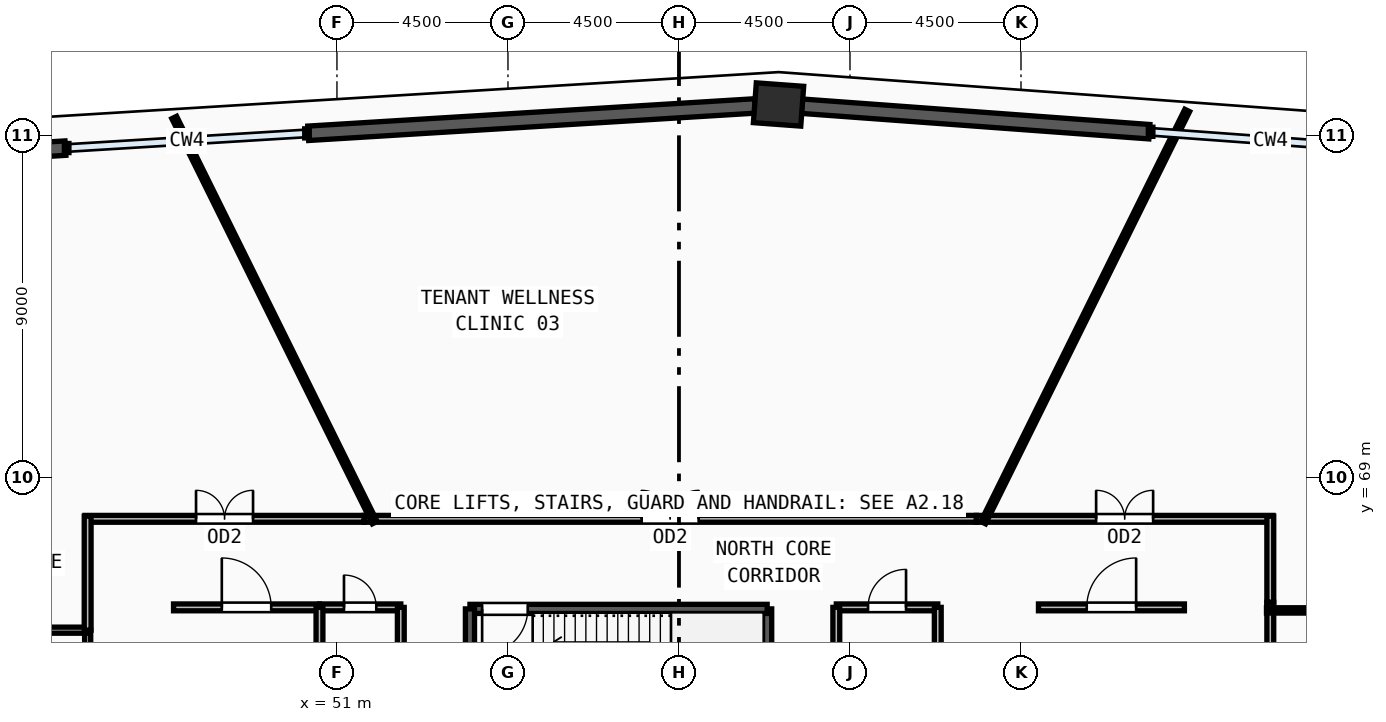
"""IFC4 building model, lengths in metres.
Left out: names, types, materials, properties, quantities, classifications, styles, units other than length and angle.
Written with IfcOpenShell. Run it as: python <this file> out.ifc"""

import sys

from ifc_helpers import new_model, si_unit, direction, frame, frame_2d, origin, origin_2d, place, context, subcontext, project, spatial, rectangle, extrude, source, transform, mapped, element, fill, save


model = new_model("IFC4")
c1 = context("Model", 3, precision=1e-05, world=origin(), true_north=direction((0.0, 1.0)))
c2 = subcontext(c1, "Body", "Model", "MODEL_VIEW")
j1 = project(units=[si_unit("LENGTHUNIT", "METRE"), si_unit("PLANEANGLEUNIT", "RADIAN")], contexts=[c1])
p1 = place(None, origin())
s1 = spatial("IfcSite", under=j1, at=p1, CompositionType="ELEMENT")
p2 = place(p1, origin())
s2 = spatial("IfcBuilding", under=s1, at=p2, CompositionType="ELEMENT")
p3 = place(p2, frame((0.0, 0.0, 189.75)))
s3 = spatial("IfcBuildingStorey", under=s2, at=p3, CompositionType="ELEMENT", Elevation=189.75)
m1 = source(origin(), c2, "Body", "SweptSolid", [
    extrude(rectangle(XDim=1.25, YDim=1.05, at=origin_2d()), origin(), (0.0, 0.0, 1.0), 4.5),
])
p4 = place(p3, frame((62.62, 78.812, 0.0), z_axis=(0.0, 0.0, 1.0), x_axis=(-0.997327244511, 0.0730641318, 0.0)))
e1 = element("IfcColumn", 1, at=p4, inside=s3, PredefinedType="COLUMN", context=c2, shape_type="MappedRepresentation", body=[
    mapped(m1, transform((0.0, 0.0, 0.0), x_axis=(1.0, 0.0, 0.0), y_axis=(0.0, 1.0, 0.0), z_axis=(0.0, 0.0, 1.0), scale=1.0)),
])
p5 = place(p3, frame((72.378, 78.096, 0.0), z_axis=(0.0, 0.0, 1.0), x_axis=(-0.997317866929, 0.073192023498, 0.0)))
e2 = element("IfcWall", 2, at=p5, inside=s3, PredefinedType="SOLIDWALL", context=c2, shape_type="SweptSolid", body=[
    extrude(rectangle(XDim=9.17, YDim=0.38, at=frame_2d((4.585, 0.0))), origin(), (0.0, 0.0, 1.0), 4.32),
])
p6 = place(p3, frame((62.006, 78.774, 0.0), z_axis=(0.0, 0.0, 1.0), x_axis=(-0.998131884523, -0.061096162719, 0.0)))
e3 = element("IfcWall", 3, at=p6, inside=s3, PredefinedType="SOLIDWALL", context=c2, shape_type="SweptSolid", body=[
    extrude(rectangle(XDim=11.784, YDim=0.38, at=frame_2d((5.892, 0.0))), origin(), (0.0, 0.0, 1.0), 4.32),
])
p7 = place(p3, frame((43.855, 77.664, 0.0), z_axis=(0.0, 0.0, 1.0), x_axis=(-0.998131807187, -0.061097426145, 0.0)))
e4 = element("IfcWall", 4, at=p7, inside=s3, PredefinedType="SOLIDWALL", context=c2, shape_type="SweptSolid", body=[
    extrude(rectangle(XDim=11.784, YDim=0.38, at=frame_2d((5.892, 0.0))), origin(), (0.0, 0.0, 1.0), 4.32),
])
p8 = place(p3, frame((62.32, 62.1, 0.0), z_axis=(0.0, 0.0, 1.0), x_axis=(0.0, 1.0, 0.0)))
e5 = element("IfcWall", 5, at=p8, inside=s3, PredefinedType="SOLIDWALL", context=c2, shape_type="SweptSolid", body=[
    extrude(rectangle(XDim=3.44, YDim=0.24, at=frame_2d((1.72, 0.0))), origin(), (0.0, 0.0, 1.0), 4.32),
])
p9 = place(p3, frame((62.32, 65.54, 0.0), z_axis=(0.0, 0.0, 1.0), x_axis=(-1.0, 0.0, 0.0)))
e6 = element("IfcWall", 6, at=p9, inside=s3, PredefinedType="SOLIDWALL", context=c2, shape_type="SweptSolid", body=[
    extrude(rectangle(XDim=7.82, YDim=0.24, at=frame_2d((3.91, 0.0))), origin(), (0.0, 0.0, 1.0), 4.32),
])
m2 = source(origin(), c2, "Body", "SweptSolid", [
    extrude(rectangle(XDim=1.2, YDim=2.2, at=frame_2d((0.6, 1.1))), frame((0.0, 0.13, 0.0), z_axis=(0.0, -1.0, 0.0), x_axis=(1.0, 0.0, 0.0)), (0.0, 0.0, 1.0), 0.26),
])
p10 = place(p9, frame((6.3, 0.0, 0.0)))
e7 = element("IfcOpeningElement", 7, at=p10, cuts=e6, PredefinedType="OPENING", context=c2, shape_type="MappedRepresentation", body=[
    mapped(m2, transform((0.0, 0.0, 0.0), x_axis=(1.0, 0.0, 0.0), y_axis=(0.0, 1.0, 0.0), z_axis=(0.0, 0.0, 1.0), scale=1.0)),
])
p11 = place(p3, frame((54.5, 65.54, 0.0), z_axis=(0.0, 0.0, 1.0), x_axis=(0.0, -1.0, 0.0)))
e8 = element("IfcWall", 8, at=p11, inside=s3, PredefinedType="SOLIDWALL", context=c2, shape_type="SweptSolid", body=[
    extrude(rectangle(XDim=3.44, YDim=0.24, at=frame_2d((1.72, 0.0))), origin(), (0.0, 0.0, 1.0), 4.32),
])
p12 = place(p3, frame((44.44, 62.24, 0.0), z_axis=(0.0, 0.0, 1.0), x_axis=(0.0, 1.0, 0.0)))
e9 = element("IfcWall", 9, at=p12, inside=s3, PredefinedType="PARTITIONING", context=c2, shape_type="SweptSolid", body=[
    extrude(rectangle(XDim=2.74, YDim=0.16, at=frame_2d((1.37, 0.0))), origin(), (0.0, 0.0, 1.0), 4.32),
])
m3 = source(origin(), c2, "Body", "SweptSolid", [
    extrude(rectangle(XDim=1.05, YDim=2.15, at=frame_2d((0.525, 1.075))), frame((0.0, 0.09, 0.0), z_axis=(0.0, -1.0, 0.0), x_axis=(1.0, 0.0, 0.0)), (0.0, 0.0, 1.0), 0.18),
])
p13 = place(p12, frame((0.845, 0.0, 0.0)))
e10 = element("IfcOpeningElement", 10, at=p13, cuts=e9, PredefinedType="OPENING", context=c2, shape_type="MappedRepresentation", body=[
    mapped(m3, transform((0.0, 0.0, 0.0), x_axis=(1.0, 0.0, 0.0), y_axis=(0.0, 1.0, 0.0), z_axis=(0.0, 0.0, 1.0), scale=1.0)),
])
p14 = place(p3, frame((50.54, 65.58, 0.0), z_axis=(0.0, 0.0, 1.0), x_axis=(1.0, 0.0, 0.0)))
e11 = element("IfcWall", 11, at=p14, inside=s3, PredefinedType="PARTITIONING", context=c2, shape_type="SweptSolid", body=[
    extrude(rectangle(XDim=2.14, YDim=0.18, at=frame_2d((1.07, 0.0))), origin(), (0.0, 0.0, 1.0), 4.32),
])
m4 = source(origin(), c2, "Body", "SweptSolid", [
    extrude(rectangle(XDim=0.85, YDim=2.1, at=frame_2d((0.425, 1.05))), frame((0.0, 0.1, 0.0), z_axis=(0.0, -1.0, 0.0), x_axis=(1.0, 0.0, 0.0)), (0.0, 0.0, 1.0), 0.2),
])
p15 = place(p14, frame((0.645, 0.0, 0.0)))
e12 = element("IfcOpeningElement", 12, at=p15, cuts=e11, PredefinedType="OPENING", context=c2, shape_type="MappedRepresentation", body=[
    mapped(m4, transform((0.0, 0.0, 0.0), x_axis=(1.0, 0.0, 0.0), y_axis=(0.0, 1.0, 0.0), z_axis=(0.0, 0.0, 1.0), scale=1.0)),
])
p16 = place(p3, frame((64.14, 65.58, 0.0), z_axis=(0.0, 0.0, 1.0), x_axis=(1.0, 0.0, 0.0)))
e13 = element("IfcWall", 13, at=p16, inside=s3, PredefinedType="PARTITIONING", context=c2, shape_type="SweptSolid", body=[
    extrude(rectangle(XDim=2.67, YDim=0.18, at=frame_2d((1.335, 0.0))), origin(), (0.0, 0.0, 1.0), 4.32),
])
m5 = source(origin(), c2, "Body", "SweptSolid", [
    extrude(rectangle(XDim=1.0, YDim=2.2, at=frame_2d((0.5, 1.1))), frame((0.0, 0.1, 0.0), z_axis=(0.0, -1.0, 0.0), x_axis=(1.0, 0.0, 0.0)), (0.0, 0.0, 1.0), 0.2),
])
p17 = place(p16, frame((0.835, 0.0, 0.0)))
e14 = element("IfcOpeningElement", 14, at=p17, cuts=e13, PredefinedType="OPENING", context=c2, shape_type="MappedRepresentation", body=[
    mapped(m5, transform((0.0, 0.0, 0.0), x_axis=(1.0, 0.0, 0.0), y_axis=(0.0, 1.0, 0.0), z_axis=(0.0, 0.0, 1.0), scale=1.0)),
])
p18 = place(p3, frame((46.7, 65.58, 0.0), z_axis=(0.0, 0.0, 1.0), x_axis=(1.0, 0.0, 0.0)))
e15 = element("IfcWall", 15, at=p18, inside=s3, PredefinedType="PARTITIONING", context=c2, shape_type="SweptSolid", body=[
    extrude(rectangle(XDim=3.84, YDim=0.18, at=frame_2d((1.92, 0.0))), origin(), (0.0, 0.0, 1.0), 4.32),
])
m6 = source(origin(), c2, "Body", "SweptSolid", [
    extrude(rectangle(XDim=1.3, YDim=2.2, at=frame_2d((0.65, 1.1))), frame((0.0, 0.1, 0.0), z_axis=(0.0, -1.0, 0.0), x_axis=(1.0, 0.0, 0.0)), (0.0, 0.0, 1.0), 0.2),
])
p19 = place(p18, frame((1.27, 0.0, 0.0)))
e16 = element("IfcOpeningElement", 16, at=p19, cuts=e15, PredefinedType="OPENING", context=c2, shape_type="MappedRepresentation", body=[
    mapped(m6, transform((0.0, 0.0, 0.0), x_axis=(1.0, 0.0, 0.0), y_axis=(0.0, 1.0, 0.0), z_axis=(0.0, 0.0, 1.0), scale=1.0)),
])
p20 = place(p3, frame((69.46, 65.58, 0.0), z_axis=(0.0, 0.0, 1.0), x_axis=(1.0, 0.0, 0.0)))
e17 = element("IfcWall", 17, at=p20, inside=s3, PredefinedType="PARTITIONING", context=c2, shape_type="SweptSolid", body=[
    extrude(rectangle(XDim=3.84, YDim=0.18, at=frame_2d((1.92, 0.0))), origin(), (0.0, 0.0, 1.0), 4.32),
])
p21 = place(p20, frame((1.27, 0.0, 0.0)))
e18 = element("IfcOpeningElement", 18, at=p21, cuts=e17, PredefinedType="OPENING", context=c2, shape_type="MappedRepresentation", body=[
    mapped(m6, transform((0.0, 0.0, 0.0), x_axis=(1.0, 0.0, 0.0), y_axis=(0.0, 1.0, 0.0), z_axis=(0.0, 0.0, 1.0), scale=1.0)),
])
p22 = place(p3, frame((75.56, 65.715, 0.0), z_axis=(0.0, 0.0, 1.0), x_axis=(0.0, -1.0, 0.0)))
e19 = element("IfcWall", 19, at=p22, inside=s3, PredefinedType="PARTITIONING", context=c2, shape_type="SweptSolid", body=[
    extrude(rectangle(XDim=20.93, YDim=0.18, at=frame_2d((10.465, 0.0))), origin(), (0.0, 0.0, 1.0), 4.32),
])
m7 = source(origin(), c2, "Body", "SweptSolid", [
    extrude(rectangle(XDim=1.5, YDim=2.2, at=frame_2d((0.75, 1.1))), frame((0.0, 0.1, 0.0), z_axis=(0.0, -1.0, 0.0), x_axis=(1.0, 0.0, 0.0)), (0.0, 0.0, 1.0), 0.2),
])
p23 = place(p22, frame((9.715, 0.0, 0.0)))
e20 = element("IfcOpeningElement", 20, at=p23, cuts=e19, PredefinedType="OPENING", context=c2, shape_type="MappedRepresentation", body=[
    mapped(m7, transform((0.0, 0.0, 0.0), x_axis=(1.0, 0.0, 0.0), y_axis=(0.0, 1.0, 0.0), z_axis=(0.0, 0.0, 1.0), scale=1.0)),
])
p24 = place(p3, frame((67.823, 67.91, 0.0), z_axis=(0.0, 0.0, 1.0), x_axis=(1.0, 0.0, 0.0)))
e21 = element("IfcWall", 21, at=p24, inside=s3, PredefinedType="PARTITIONING", context=c2, shape_type="SweptSolid", body=[
    extrude(rectangle(XDim=7.807, YDim=0.18, at=frame_2d((3.903, 0.0))), origin(), (0.0, 0.0, 1.0), 4.32),
])
p25 = place(p24, frame((3.154, 0.0, 0.0)))
e22 = element("IfcOpeningElement", 22, at=p25, cuts=e21, PredefinedType="OPENING", context=c2, shape_type="MappedRepresentation", body=[
    mapped(m7, transform((0.0, 0.0, 0.0), x_axis=(1.0, 0.0, 0.0), y_axis=(0.0, 1.0, 0.0), z_axis=(0.0, 0.0, 1.0), scale=1.0)),
])
p26 = place(p3, frame((51.714, 67.91, 0.0), z_axis=(0.0, 0.0, 1.0), x_axis=(1.0, 0.0, 0.0)))
e23 = element("IfcWall", 23, at=p26, inside=s3, PredefinedType="PARTITIONING", context=c2, shape_type="SweptSolid", body=[
    extrude(rectangle(XDim=16.109, YDim=0.18, at=frame_2d((8.054, 0.0))), origin(), (0.0, 0.0, 1.0), 4.32),
])
p27 = place(p26, frame((7.304, 0.0, 0.0)))
e24 = element("IfcOpeningElement", 24, at=p27, cuts=e23, PredefinedType="OPENING", context=c2, shape_type="MappedRepresentation", body=[
    mapped(m7, transform((0.0, 0.0, 0.0), x_axis=(1.0, 0.0, 0.0), y_axis=(0.0, 1.0, 0.0), z_axis=(0.0, 0.0, 1.0), scale=1.0)),
])
p28 = place(p3, frame((44.37, 67.91, 0.0), z_axis=(0.0, 0.0, 1.0), x_axis=(1.0, 0.0, 0.0)))
e25 = element("IfcWall", 25, at=p28, inside=s3, PredefinedType="PARTITIONING", context=c2, shape_type="SweptSolid", body=[
    extrude(rectangle(XDim=7.344, YDim=0.18, at=frame_2d((3.672, 0.0))), origin(), (0.0, 0.0, 1.0), 4.32),
])
p29 = place(p28, frame((2.922, 0.0, 0.0)))
e26 = element("IfcOpeningElement", 26, at=p29, cuts=e25, PredefinedType="OPENING", context=c2, shape_type="MappedRepresentation", body=[
    mapped(m7, transform((0.0, 0.0, 0.0), x_axis=(1.0, 0.0, 0.0), y_axis=(0.0, 1.0, 0.0), z_axis=(0.0, 0.0, 1.0), scale=1.0)),
])
p30 = place(p3, frame((39.98, 64.98, 0.0), z_axis=(0.0, 0.0, 1.0), x_axis=(1.0, 0.0, 0.0)))
e27 = element("IfcWall", 27, at=p30, inside=s3, PredefinedType="PARTITIONING", context=c2, shape_type="SweptSolid", body=[
    extrude(rectangle(XDim=4.46, YDim=0.16, at=frame_2d((2.23, 0.0))), origin(), (0.0, 0.0, 1.0), 4.32),
])
p31 = place(p3, frame((50.54, 61.95, 0.0), z_axis=(0.0, 0.0, 1.0), x_axis=(0.0, 1.0, 0.0)))
e28 = element("IfcWall", 28, at=p31, inside=s3, PredefinedType="PARTITIONING", context=c2, shape_type="SweptSolid", body=[
    extrude(rectangle(XDim=3.63, YDim=0.18, at=frame_2d((1.815, 0.0))), origin(), (0.0, 0.0, 1.0), 4.32),
])
for number, where, z_axis, x_axis in (
    (29, (52.68, 61.825, 0.0), (0.0, 0.0, 1.0), (0.0, 1.0, 0.0)),
    (30, (64.14, 61.825, 0.0), (0.0, 0.0, 1.0), (0.0, 1.0, 0.0)),
    (31, (66.81, 61.825, 0.0), (0.0, 0.0, 1.0), (0.0, 1.0, 0.0)),
):
    element("IfcWall", number, at=place(p3, frame(where, z_axis=z_axis, x_axis=x_axis)), inside=s3, PredefinedType="PARTITIONING", context=c2, shape_type="SweptSolid", body=[
        extrude(rectangle(XDim=3.755, YDim=0.18, at=frame_2d((1.877, 0.0))), origin(), (0.0, 0.0, 1.0), 4.32),
    ])
p32 = place(p3, frame((75.56, 67.98, 0.0), z_axis=(0.0, 0.0, 1.0), x_axis=(0.0, -1.0, 0.0)))
e32 = element("IfcWall", 32, at=p32, inside=s3, PredefinedType="PARTITIONING", context=c2, shape_type="SweptSolid", body=[
    extrude(rectangle(XDim=2.265, YDim=0.18, at=frame_2d((1.132, 0.0))), origin(), (0.0, 0.0, 1.0), 4.32),
])
p33 = place(p3, frame((44.44, 64.98, 0.0), z_axis=(0.0, 0.0, 1.0), x_axis=(0.0, 1.0, 0.0)))
e33 = element("IfcWall", 33, at=p33, inside=s3, PredefinedType="PARTITIONING", context=c2, shape_type="SweptSolid", body=[
    extrude(rectangle(XDim=3.0, YDim=0.18, at=frame_2d((1.5, 0.0))), origin(), (0.0, 0.0, 1.0), 4.32),
])
p34 = place(p3, frame((75.46, 65.5, 0.0), z_axis=(0.0, 0.0, 1.0), x_axis=(1.0, 0.0, 0.0)))
e34 = element("IfcWall", 34, at=p34, inside=s3, PredefinedType="PARTITIONING", context=c2, shape_type="SweptSolid", body=[
    extrude(rectangle(XDim=18.471, YDim=0.14, at=frame_2d((9.235, 0.0))), origin(), (0.0, 0.0, 1.0), 3.605),
])
p35 = place(p3, frame((51.995, 67.81, 0.0), z_axis=(0.0, 0.0, 1.0), x_axis=(-0.443655075379, 0.896197619998, 0.0)))
e35 = element("IfcWall", 35, at=p35, inside=s3, PredefinedType="PARTITIONING", context=c2, shape_type="SweptSolid", body=[
    extrude(rectangle(XDim=11.895, YDim=0.14, at=frame_2d((5.947, 0.0))), origin(), (0.0, 0.0, 1.0), 4.32),
])
p36 = place(p3, frame((68.005, 67.81, 0.0), z_axis=(0.0, 0.0, 1.0), x_axis=(0.443683569349, 0.896183513735, 0.0)))
e36 = element("IfcWall", 36, at=p36, inside=s3, PredefinedType="PARTITIONING", context=c2, shape_type="SweptSolid", body=[
    extrude(rectangle(XDim=12.101, YDim=0.14, at=frame_2d((6.051, 0.0))), origin(), (0.0, 0.0, 1.0), 4.32),
])
m8 = source(origin(), c2, "Body", "SweptSolid", [
    extrude(rectangle(XDim=1.2, YDim=2.2, at=frame_2d((0.6, 1.1))), frame((0.0, 0.025, 0.0), z_axis=(0.0, -1.0, 0.0), x_axis=(1.0, 0.0, 0.0)), (0.0, 0.0, 1.0), 0.05),
])
p37 = place(p10, origin())
e37 = element("IfcDoor", 37, at=p37, inside=s3, OperationType="SINGLE_SWING_RIGHT", PredefinedType="DOOR", context=c2, shape_type="MappedRepresentation", body=[
    mapped(m8, transform((0.0, 0.0, 0.0), x_axis=(1.0, 0.0, 0.0), y_axis=(0.0, 1.0, 0.0), z_axis=(0.0, 0.0, 1.0), scale=1.0)),
])
fill(e7, e37)
m9 = source(origin(), c2, "Body", "SweptSolid", [
    extrude(rectangle(XDim=0.85, YDim=2.1, at=frame_2d((0.425, 1.05))), frame((0.0, 0.025, 0.0), z_axis=(0.0, -1.0, 0.0), x_axis=(1.0, 0.0, 0.0)), (0.0, 0.0, 1.0), 0.05),
])
p38 = place(p15, origin())
e38 = element("IfcDoor", 38, at=p38, inside=s3, OperationType="SINGLE_SWING_LEFT", PredefinedType="DOOR", context=c2, shape_type="MappedRepresentation", body=[
    mapped(m9, transform((0.0, 0.0, 0.0), x_axis=(1.0, 0.0, 0.0), y_axis=(0.0, 1.0, 0.0), z_axis=(0.0, 0.0, 1.0), scale=1.0)),
])
fill(e12, e38)
m10 = source(origin(), c2, "Body", "SweptSolid", [
    extrude(rectangle(XDim=1.0, YDim=2.2, at=frame_2d((0.5, 1.1))), frame((0.0, 0.025, 0.0), z_axis=(0.0, -1.0, 0.0), x_axis=(1.0, 0.0, 0.0)), (0.0, 0.0, 1.0), 0.05),
])
p39 = place(p17, origin())
e39 = element("IfcDoor", 39, at=p39, inside=s3, OperationType="SINGLE_SWING_RIGHT", PredefinedType="DOOR", context=c2, shape_type="MappedRepresentation", body=[
    mapped(m10, transform((0.0, 0.0, 0.0), x_axis=(1.0, 0.0, 0.0), y_axis=(0.0, 1.0, 0.0), z_axis=(0.0, 0.0, 1.0), scale=1.0)),
])
fill(e14, e39)
m11 = source(origin(), c2, "Body", "SweptSolid", [
    extrude(rectangle(XDim=1.3, YDim=2.2, at=frame_2d((0.65, 1.1))), frame((0.0, 0.025, 0.0), z_axis=(0.0, -1.0, 0.0), x_axis=(1.0, 0.0, 0.0)), (0.0, 0.0, 1.0), 0.05),
])
p40 = place(p19, origin())
e40 = element("IfcDoor", 40, at=p40, inside=s3, OperationType="SINGLE_SWING_LEFT", PredefinedType="DOOR", context=c2, shape_type="MappedRepresentation", body=[
    mapped(m11, transform((0.0, 0.0, 0.0), x_axis=(1.0, 0.0, 0.0), y_axis=(0.0, 1.0, 0.0), z_axis=(0.0, 0.0, 1.0), scale=1.0)),
])
fill(e16, e40)
p41 = place(p21, origin())
e41 = element("IfcDoor", 41, at=p41, inside=s3, OperationType="SINGLE_SWING_RIGHT", PredefinedType="DOOR", context=c2, shape_type="MappedRepresentation", body=[
    mapped(m11, transform((0.0, 0.0, 0.0), x_axis=(1.0, 0.0, 0.0), y_axis=(0.0, 1.0, 0.0), z_axis=(0.0, 0.0, 1.0), scale=1.0)),
])
fill(e18, e41)
m12 = source(origin(), c2, "Body", "SweptSolid", [
    extrude(rectangle(XDim=1.5, YDim=2.2, at=frame_2d((0.75, 1.1))), frame((0.0, 0.025, 0.0), z_axis=(0.0, -1.0, 0.0), x_axis=(1.0, 0.0, 0.0)), (0.0, 0.0, 1.0), 0.05),
])
p42 = place(p25, origin())
e42 = element("IfcDoor", 42, at=p42, inside=s3, OperationType="DOUBLE_DOOR_SINGLE_SWING", PredefinedType="DOOR", context=c2, shape_type="MappedRepresentation", body=[
    mapped(m12, transform((0.0, 0.0, 0.0), x_axis=(1.0, 0.0, 0.0), y_axis=(0.0, 1.0, 0.0), z_axis=(0.0, 0.0, 1.0), scale=1.0)),
])
fill(e22, e42)
p43 = place(p27, origin())
e43 = element("IfcDoor", 43, at=p43, inside=s3, OperationType="DOUBLE_DOOR_SINGLE_SWING", PredefinedType="DOOR", context=c2, shape_type="MappedRepresentation", body=[
    mapped(m12, transform((0.0, 0.0, 0.0), x_axis=(1.0, 0.0, 0.0), y_axis=(0.0, 1.0, 0.0), z_axis=(0.0, 0.0, 1.0), scale=1.0)),
])
fill(e24, e43)
p44 = place(p29, origin())
e44 = element("IfcDoor", 44, at=p44, inside=s3, OperationType="DOUBLE_DOOR_SINGLE_SWING", PredefinedType="DOOR", context=c2, shape_type="MappedRepresentation", body=[
    mapped(m12, transform((0.0, 0.0, 0.0), x_axis=(1.0, 0.0, 0.0), y_axis=(0.0, 1.0, 0.0), z_axis=(0.0, 0.0, 1.0), scale=1.0)),
])
fill(e26, e44)
save(model, sys.argv[1])
